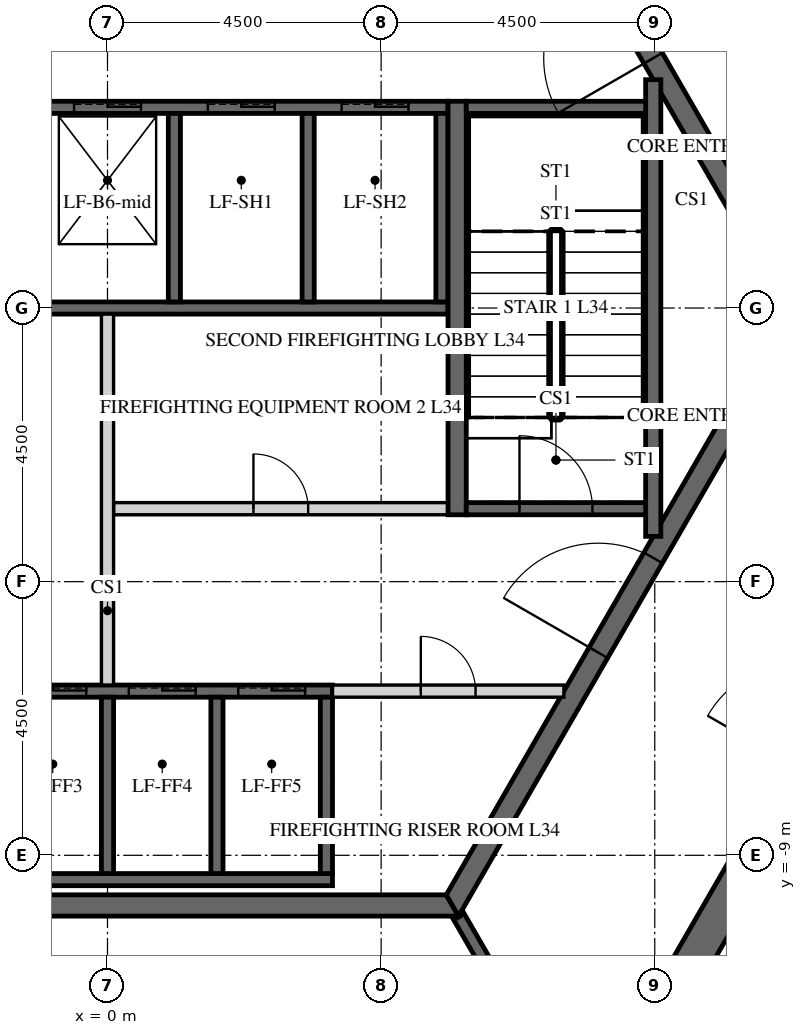
"""IFC4 building model, lengths in metres.
Left out: names, types, materials, properties, quantities, classifications, styles, units other than length and angle.
Written with IfcOpenShell. Run it as: python <this file> out.ifc"""

import sys

from ifc_helpers import new_model, si_unit, direction, frame, frame_2d, origin, place, context, subcontext, project, spatial, polyline, rectangle, outline, extrude, element, fill, save


model = new_model("IFC4")
c1 = context("Model", 3, precision=1e-05, world=origin(), true_north=direction((0.0, 1.0)))
c2 = subcontext(c1, "Body", "Model", "MODEL_VIEW")
j1 = project(units=[si_unit("LENGTHUNIT", "METRE"), si_unit("PLANEANGLEUNIT", "RADIAN")], contexts=[c1])
p1 = place(None, origin())
s1 = spatial("IfcSite", under=j1, at=p1, CompositionType="ELEMENT")
p2 = place(p1, origin())
s2 = spatial("IfcBuilding", under=s1, at=p2, CompositionType="ELEMENT")
p3 = place(p2, frame((0.0, 0.0, 146.7)))
s3 = spatial("IfcBuildingStorey", under=s2, at=p3, CompositionType="ELEMENT", Elevation=146.7)
p4 = place(p3, frame((7.91, -13.7, -0.3), z_axis=(0.0, 0.0, 1.0), x_axis=(0.499999880136, 0.866025472988, 0.0)))
e1 = element("IfcWall", 1, at=p4, inside=s3, PredefinedType="SHEAR", context=c2, shape_type="SweptSolid", body=[
    extrude(outline(polyline([(-0.173, -0.3), (15.993, -0.3), (15.646, 0.3), (0.173, 0.3), (-0.173, -0.3)])), origin(), (0.0, 0.0, 1.0), 5.8),
])
p5 = place(p4, frame((7.039, 0.0, 0.3)))
e2 = element("IfcOpeningElement", 2, at=p5, cuts=e1, PredefinedType="OPENING", context=c2, shape_type="SweptSolid", body=[
    extrude(rectangle(XDim=1.8, YDim=2.4, at=frame_2d((0.9, 1.2))), frame((0.0, 0.31, 0.0), z_axis=(0.0, -1.0, 0.0), x_axis=(1.0, 0.0, 0.0)), (0.0, 0.0, 1.0), 0.62),
])
p6 = place(p3, frame((15.819, 0.0, -0.3), z_axis=(0.0, 0.0, 1.0), x_axis=(-0.499999880136, 0.866025472988, 0.0)))
e3 = element("IfcWall", 3, at=p6, inside=s3, PredefinedType="SHEAR", context=c2, shape_type="SweptSolid", body=[
    extrude(outline(polyline([(-0.173, -0.3), (15.993, -0.3), (15.646, 0.3), (0.173, 0.3), (-0.173, -0.3)])), origin(), (0.0, 0.0, 1.0), 5.8),
])
p7 = place(p6, frame((6.981, 0.0, 0.3)))
e4 = element("IfcOpeningElement", 4, at=p7, cuts=e3, PredefinedType="OPENING", context=c2, shape_type="SweptSolid", body=[
    extrude(rectangle(XDim=1.8, YDim=2.4, at=frame_2d((0.9, 1.2))), frame((0.0, 0.31, 0.0), z_axis=(0.0, -1.0, 0.0), x_axis=(1.0, 0.0, 0.0)), (0.0, 0.0, 1.0), 0.62),
])
p8 = place(p3, frame((-5.673, -9.825, -0.3), z_axis=(0.0, 0.0, 1.0), x_axis=(1.0, 0.0, 0.0)))
e5 = element("IfcWall", 5, at=p8, inside=s3, PredefinedType="SHEAR", context=c2, shape_type="SweptSolid", body=[
    extrude(outline(polyline([(-0.101, -0.175), (11.446, -0.175), (11.244, 0.175), (0.101, 0.175), (-0.101, -0.175)])), origin(), (0.0, 0.0, 1.0), 5.8),
])
p9 = place(p3, frame((5.673, -9.825, -0.3), z_axis=(0.0, 0.0, 1.0), x_axis=(0.499995046907, 0.866028263435, 0.0)))
e6 = element("IfcWall", 6, at=p9, inside=s3, PredefinedType="SHEAR", context=c2, shape_type="SweptSolid", body=[
    extrude(outline(polyline([(-0.101, -0.175), (11.446, -0.175), (11.244, 0.175), (0.101, 0.175), (-0.101, -0.175)])), origin(), (0.0, 0.0, 1.0), 5.8),
])
p10 = place(p9, frame((4.801, 0.0, 0.3)))
e7 = element("IfcOpeningElement", 7, at=p10, cuts=e6, PredefinedType="OPENING", context=c2, shape_type="SweptSolid", body=[
    extrude(rectangle(XDim=1.8, YDim=2.4, at=frame_2d((0.9, 1.2))), frame((0.0, 0.185, 0.0), z_axis=(0.0, -1.0, 0.0), x_axis=(1.0, 0.0, 0.0)), (0.0, 0.0, 1.0), 0.37),
])
p11 = place(p3, frame((11.345, 0.0, -0.3), z_axis=(0.0, 0.0, 1.0), x_axis=(-0.499995046907, 0.866028263435, 0.0)))
e8 = element("IfcWall", 8, at=p11, inside=s3, PredefinedType="SHEAR", context=c2, shape_type="SweptSolid", body=[
    extrude(outline(polyline([(-0.101, -0.175), (11.446, -0.175), (11.244, 0.175), (0.101, 0.175), (-0.101, -0.175)])), origin(), (0.0, 0.0, 1.0), 5.8),
])
p12 = place(p11, frame((4.744, 0.0, 0.3)))
e9 = element("IfcOpeningElement", 9, at=p12, cuts=e8, PredefinedType="OPENING", context=c2, shape_type="SweptSolid", body=[
    extrude(rectangle(XDim=1.8, YDim=2.4, at=frame_2d((0.9, 1.2))), frame((0.0, 0.185, 0.0), z_axis=(0.0, -1.0, 0.0), x_axis=(1.0, 0.0, 0.0)), (0.0, 0.0, 1.0), 0.37),
])
p13 = place(p3, frame((-5.6, 3.3, -0.25), z_axis=(0.0, 0.0, 1.0), x_axis=(1.0, 0.0, 0.0)))
e10 = element("IfcWall", 10, at=p13, inside=s3, PredefinedType="SHEAR", context=c2, shape_type="SweptSolid", body=[
    extrude(rectangle(XDim=11.2, YDim=0.2, at=frame_2d((5.6, 0.0))), origin(), (0.0, 0.0, 1.0), 5.75),
])
p14 = place(p13, frame((0.65, 0.0, 0.25)))
e11 = element("IfcOpeningElement", 11, at=p14, cuts=e10, PredefinedType="OPENING", context=c2, shape_type="SweptSolid", body=[
    extrude(rectangle(XDim=1.1, YDim=2.1, at=frame_2d((0.55, 1.05))), frame((0.0, 0.11, 0.0), z_axis=(0.0, -1.0, 0.0), x_axis=(1.0, 0.0, 0.0)), (0.0, 0.0, 1.0), 0.22),
])
p15 = place(p13, frame((2.85, 0.0, 0.25)))
e12 = element("IfcOpeningElement", 12, at=p15, cuts=e10, PredefinedType="OPENING", context=c2, shape_type="SweptSolid", body=[
    extrude(rectangle(XDim=1.1, YDim=2.1, at=frame_2d((0.55, 1.05))), frame((0.0, 0.11, 0.0), z_axis=(0.0, -1.0, 0.0), x_axis=(1.0, 0.0, 0.0)), (0.0, 0.0, 1.0), 0.22),
])
p16 = place(p13, frame((5.05, 0.0, 0.25)))
e13 = element("IfcOpeningElement", 13, at=p16, cuts=e10, PredefinedType="OPENING", context=c2, shape_type="SweptSolid", body=[
    extrude(rectangle(XDim=1.1, YDim=2.1, at=frame_2d((0.55, 1.05))), frame((0.0, 0.11, 0.0), z_axis=(0.0, -1.0, 0.0), x_axis=(1.0, 0.0, 0.0)), (0.0, 0.0, 1.0), 0.22),
])
p17 = place(p13, frame((7.25, 0.0, 0.25)))
e14 = element("IfcOpeningElement", 14, at=p17, cuts=e10, PredefinedType="OPENING", context=c2, shape_type="SweptSolid", body=[
    extrude(rectangle(XDim=1.1, YDim=2.1, at=frame_2d((0.55, 1.05))), frame((0.0, 0.11, 0.0), z_axis=(0.0, -1.0, 0.0), x_axis=(1.0, 0.0, 0.0)), (0.0, 0.0, 1.0), 0.22),
])
p18 = place(p13, frame((9.45, 0.0, 0.25)))
e15 = element("IfcOpeningElement", 15, at=p18, cuts=e10, PredefinedType="OPENING", context=c2, shape_type="SweptSolid", body=[
    extrude(rectangle(XDim=1.1, YDim=2.1, at=frame_2d((0.55, 1.05))), frame((0.0, 0.11, 0.0), z_axis=(0.0, -1.0, 0.0), x_axis=(1.0, 0.0, 0.0)), (0.0, 0.0, 1.0), 0.22),
])
p19 = place(p3, frame((-5.6, 0.0, -0.25), z_axis=(0.0, 0.0, 1.0), x_axis=(1.0, 0.0, 0.0)))
e16 = element("IfcWall", 16, at=p19, inside=s3, PredefinedType="SHEAR", context=c2, shape_type="SweptSolid", body=[
    extrude(rectangle(XDim=11.2, YDim=0.2, at=frame_2d((5.6, 0.0))), origin(), (0.0, 0.0, 1.0), 5.75),
])
for number, where, z_axis, x_axis in (
    (17, (1.1, 0.1, -0.25), (0.0, 0.0, 1.0), (0.0, 1.0, 0.0)),
    (18, (3.3, 0.1, -0.25), (0.0, 0.0, 1.0), (0.0, 1.0, 0.0)),
    (19, (5.5, 0.1, -0.25), (0.0, 0.0, 1.0), (0.0, 1.0, 0.0)),
):
    element("IfcWall", number, at=place(p3, frame(where, z_axis=z_axis, x_axis=x_axis)), inside=s3, PredefinedType="SHEAR", context=c2, shape_type="SweptSolid", body=[
        extrude(rectangle(XDim=3.1, YDim=0.2, at=frame_2d((1.55, 0.0))), origin(), (0.0, 0.0, 1.0), 5.75),
    ])
p20 = place(p3, frame((-5.5, -6.3, -0.25), z_axis=(0.0, 0.0, 1.0), x_axis=(1.0, 0.0, 0.0)))
e20 = element("IfcWall", 20, at=p20, inside=s3, PredefinedType="SHEAR", context=c2, shape_type="SweptSolid", body=[
    extrude(rectangle(XDim=9.2, YDim=0.2, at=frame_2d((4.6, 0.0))), origin(), (0.0, 0.0, 1.0), 5.75),
])
p21 = place(p20, frame((0.45, 0.0, 0.25)))
e21 = element("IfcOpeningElement", 21, at=p21, cuts=e20, PredefinedType="OPENING", context=c2, shape_type="SweptSolid", body=[
    extrude(rectangle(XDim=1.1, YDim=2.1, at=frame_2d((0.55, 1.05))), frame((0.0, 0.11, 0.0), z_axis=(0.0, -1.0, 0.0), x_axis=(1.0, 0.0, 0.0)), (0.0, 0.0, 1.0), 0.22),
])
p22 = place(p20, frame((2.25, 0.0, 0.25)))
e22 = element("IfcOpeningElement", 22, at=p22, cuts=e20, PredefinedType="OPENING", context=c2, shape_type="SweptSolid", body=[
    extrude(rectangle(XDim=1.1, YDim=2.1, at=frame_2d((0.55, 1.05))), frame((0.0, 0.11, 0.0), z_axis=(0.0, -1.0, 0.0), x_axis=(1.0, 0.0, 0.0)), (0.0, 0.0, 1.0), 0.22),
])
p23 = place(p20, frame((4.05, 0.0, 0.25)))
e23 = element("IfcOpeningElement", 23, at=p23, cuts=e20, PredefinedType="OPENING", context=c2, shape_type="SweptSolid", body=[
    extrude(rectangle(XDim=1.1, YDim=2.1, at=frame_2d((0.55, 1.05))), frame((0.0, 0.11, 0.0), z_axis=(0.0, -1.0, 0.0), x_axis=(1.0, 0.0, 0.0)), (0.0, 0.0, 1.0), 0.22),
])
p24 = place(p20, frame((5.85, 0.0, 0.25)))
e24 = element("IfcOpeningElement", 24, at=p24, cuts=e20, PredefinedType="OPENING", context=c2, shape_type="SweptSolid", body=[
    extrude(rectangle(XDim=1.1, YDim=2.1, at=frame_2d((0.55, 1.05))), frame((0.0, 0.11, 0.0), z_axis=(0.0, -1.0, 0.0), x_axis=(1.0, 0.0, 0.0)), (0.0, 0.0, 1.0), 0.22),
])
p25 = place(p20, frame((7.65, 0.0, 0.25)))
e25 = element("IfcOpeningElement", 25, at=p25, cuts=e20, PredefinedType="OPENING", context=c2, shape_type="SweptSolid", body=[
    extrude(rectangle(XDim=1.1, YDim=2.1, at=frame_2d((0.55, 1.05))), frame((0.0, 0.11, 0.0), z_axis=(0.0, -1.0, 0.0), x_axis=(1.0, 0.0, 0.0)), (0.0, 0.0, 1.0), 0.22),
])
p26 = place(p3, frame((-5.5, -9.4, -0.25), z_axis=(0.0, 0.0, 1.0), x_axis=(1.0, 0.0, 0.0)))
e26 = element("IfcWall", 26, at=p26, inside=s3, PredefinedType="SHEAR", context=c2, shape_type="SweptSolid", body=[
    extrude(rectangle(XDim=9.2, YDim=0.2, at=frame_2d((4.6, 0.0))), origin(), (0.0, 0.0, 1.0), 5.75),
])
for number, where, z_axis, x_axis in (
    (27, (0.0, -9.3, -0.25), (0.0, 0.0, 1.0), (0.0, 1.0, 0.0)),
    (28, (1.8, -9.3, -0.25), (0.0, 0.0, 1.0), (0.0, 1.0, 0.0)),
    (29, (3.6, -9.3, -0.25), (0.0, 0.0, 1.0), (0.0, 1.0, 0.0)),
):
    element("IfcWall", number, at=place(p3, frame(where, z_axis=z_axis, x_axis=x_axis)), inside=s3, PredefinedType="SHEAR", context=c2, shape_type="SweptSolid", body=[
        extrude(rectangle(XDim=2.9, YDim=0.2, at=frame_2d((1.45, 0.0))), origin(), (0.0, 0.0, 1.0), 5.75),
    ])
p27 = place(p3, frame((0.1, -3.3, 0.0), z_axis=(0.0, 0.0, 1.0), x_axis=(1.0, 0.0, 0.0)))
e30 = element("IfcWall", 30, at=p27, inside=s3, PredefinedType="PARTITIONING", context=c2, shape_type="SweptSolid", body=[
    extrude(rectangle(XDim=5.5, YDim=0.2, at=frame_2d((2.75, 0.0))), origin(), (0.0, 0.0, 1.0), 5.5),
])
p28 = place(p27, frame((2.3, 0.0, 0.0)))
e31 = element("IfcOpeningElement", 31, at=p28, cuts=e30, PredefinedType="OPENING", context=c2, shape_type="SweptSolid", body=[
    extrude(rectangle(XDim=0.9, YDim=2.1, at=frame_2d((0.45, 1.05))), frame((0.0, 0.11, 0.0), z_axis=(0.0, -1.0, 0.0), x_axis=(1.0, 0.0, 0.0)), (0.0, 0.0, 1.0), 0.22),
])
p29 = place(p3, frame((0.0, -6.2, 0.0), z_axis=(0.0, 0.0, 1.0), x_axis=(0.0, 1.0, 0.0)))
e32 = element("IfcWall", 32, at=p29, inside=s3, PredefinedType="PARTITIONING", context=c2, shape_type="SweptSolid", body=[
    extrude(rectangle(XDim=6.1, YDim=0.2, at=frame_2d((3.05, 0.0))), origin(), (0.0, 0.0, 1.0), 5.5),
])
p30 = place(p3, frame((3.7, -6.3, 0.0), z_axis=(0.0, 0.0, 1.0), x_axis=(1.0, 0.0, 0.0)))
e33 = element("IfcWall", 33, at=p30, inside=s3, PredefinedType="PARTITIONING", context=c2, shape_type="SweptSolid", body=[
    extrude(rectangle(XDim=3.806, YDim=0.2, at=frame_2d((1.903, 0.0))), origin(), (0.0, 0.0, 1.0), 5.5),
])
p31 = place(p30, frame((1.453, 0.0, 0.0)))
e34 = element("IfcOpeningElement", 34, at=p31, cuts=e33, PredefinedType="OPENING", context=c2, shape_type="SweptSolid", body=[
    extrude(rectangle(XDim=0.9, YDim=2.1, at=frame_2d((0.45, 1.05))), frame((0.0, 0.11, 0.0), z_axis=(0.0, -1.0, 0.0), x_axis=(1.0, 0.0, 0.0)), (0.0, 0.0, 1.0), 0.22),
])
p32 = place(p3, frame((5.773, -10.0, -0.3), z_axis=(0.0, 0.0, 1.0), x_axis=(0.500038251005, -0.86600331843, 0.0)))
e35 = element("IfcWall", 35, at=p32, inside=s3, PredefinedType="SHEAR", context=c2, shape_type="SweptSolid", body=[
    extrude(rectangle(XDim=3.926, YDim=0.2, at=frame_2d((1.963, 0.0))), origin(), (0.0, 0.0, 1.0), 5.8),
])
p33 = place(p3, frame((5.75, -3.4, -0.25), z_axis=(0.0, 0.0, 1.0), x_axis=(0.0, 1.0, 0.0)))
e36 = element("IfcWall", 36, at=p33, inside=s3, PredefinedType="SHEAR", context=c2, shape_type="SweptSolid", body=[
    extrude(rectangle(XDim=6.8, YDim=0.3, at=frame_2d((3.4, 0.0))), origin(), (0.0, 0.0, 1.0), 5.75),
])
p34 = place(p3, frame((8.975, -3.755, -0.25), z_axis=(0.0, 0.0, 1.0), x_axis=(0.0, 1.0, 0.0)))
e37 = element("IfcWall", 37, at=p34, inside=s3, PredefinedType="SHEAR", context=c2, shape_type="SweptSolid", body=[
    extrude(rectangle(XDim=7.51, YDim=0.25, at=frame_2d((3.755, 0.0))), origin(), (0.0, 0.0, 1.0), 5.75),
])
p35 = place(p3, frame((5.9, 3.3, -0.25), z_axis=(0.0, 0.0, 1.0), x_axis=(1.0, 0.0, 0.0)))
e38 = element("IfcWall", 38, at=p35, inside=s3, PredefinedType="SHEAR", context=c2, shape_type="SweptSolid", body=[
    extrude(rectangle(XDim=2.95, YDim=0.2, at=frame_2d((1.475, 0.0))), origin(), (0.0, 0.0, 1.0), 5.75),
])
p36 = place(p3, frame((5.9, -3.3, -0.25), z_axis=(0.0, 0.0, 1.0), x_axis=(1.0, 0.0, 0.0)))
e39 = element("IfcWall", 39, at=p36, inside=s3, PredefinedType="SHEAR", context=c2, shape_type="SweptSolid", body=[
    extrude(rectangle(XDim=2.95, YDim=0.2, at=frame_2d((1.475, 0.0))), origin(), (0.0, 0.0, 1.0), 5.75),
])
p37 = place(p36, frame((0.875, 0.0, 0.25)))
e40 = element("IfcOpeningElement", 40, at=p37, cuts=e39, PredefinedType="OPENING", context=c2, shape_type="SweptSolid", body=[
    extrude(rectangle(XDim=1.2, YDim=2.4, at=frame_2d((0.6, 1.2))), frame((0.0, 0.11, 0.0), z_axis=(0.0, -1.0, 0.0), x_axis=(1.0, 0.0, 0.0)), (0.0, 0.0, 1.0), 0.22),
])
p38 = place(p12, origin())
e41 = element("IfcDoor", 41, at=p38, inside=s3, OperationType="DOUBLE_DOOR_SINGLE_SWING", PredefinedType="DOOR", context=c2, shape_type="SweptSolid", body=[
    extrude(rectangle(XDim=1.8, YDim=2.4, at=frame_2d((0.9, 1.2))), frame((0.0, 0.025, 0.0), z_axis=(0.0, -1.0, 0.0), x_axis=(1.0, 0.0, 0.0)), (0.0, 0.0, 1.0), 0.05),
])
fill(e9, e41)
p39 = place(p10, origin())
e42 = element("IfcDoor", 42, at=p39, inside=s3, OperationType="DOUBLE_DOOR_SINGLE_SWING", PredefinedType="DOOR", context=c2, shape_type="SweptSolid", body=[
    extrude(rectangle(XDim=1.8, YDim=2.4, at=frame_2d((0.9, 1.2))), frame((0.0, 0.025, 0.0), z_axis=(0.0, -1.0, 0.0), x_axis=(1.0, 0.0, 0.0)), (0.0, 0.0, 1.0), 0.05),
])
fill(e7, e42)
p40 = place(p28, origin())
e43 = element("IfcDoor", 43, at=p40, inside=s3, OperationType="SINGLE_SWING_LEFT", PredefinedType="DOOR", context=c2, shape_type="SweptSolid", body=[
    extrude(rectangle(XDim=0.9, YDim=2.1, at=frame_2d((0.45, 1.05))), frame((0.0, 0.025, 0.0), z_axis=(0.0, -1.0, 0.0), x_axis=(1.0, 0.0, 0.0)), (0.0, 0.0, 1.0), 0.05),
])
fill(e31, e43)
p41 = place(p31, origin())
e44 = element("IfcDoor", 44, at=p41, inside=s3, OperationType="SINGLE_SWING_LEFT", PredefinedType="DOOR", context=c2, shape_type="SweptSolid", body=[
    extrude(rectangle(XDim=0.9, YDim=2.1, at=frame_2d((0.45, 1.05))), frame((0.0, 0.025, 0.0), z_axis=(0.0, -1.0, 0.0), x_axis=(1.0, 0.0, 0.0)), (0.0, 0.0, 1.0), 0.05),
])
fill(e34, e44)
p42 = place(p37, origin())
e45 = element("IfcDoor", 45, at=p42, inside=s3, OperationType="SINGLE_SWING_LEFT", PredefinedType="DOOR", context=c2, shape_type="SweptSolid", body=[
    extrude(rectangle(XDim=1.2, YDim=2.4, at=frame_2d((0.6, 1.2))), frame((0.0, 0.025, 0.0), z_axis=(0.0, -1.0, 0.0), x_axis=(1.0, 0.0, 0.0)), (0.0, 0.0, 1.0), 0.05),
])
fill(e40, e45)
p43 = place(p16, origin())
e46 = element("IfcDoor", 46, at=p43, inside=s3, OperationType="SLIDING_TO_LEFT", PredefinedType="DOOR", context=c2, shape_type="SweptSolid", body=[
    extrude(rectangle(XDim=1.1, YDim=2.1, at=frame_2d((0.55, 1.05))), frame((0.0, 0.025, 0.0), z_axis=(0.0, -1.0, 0.0), x_axis=(1.0, 0.0, 0.0)), (0.0, 0.0, 1.0), 0.05),
])
fill(e13, e46)
p44 = place(p17, origin())
e47 = element("IfcDoor", 47, at=p44, inside=s3, OperationType="SLIDING_TO_LEFT", PredefinedType="DOOR", context=c2, shape_type="SweptSolid", body=[
    extrude(rectangle(XDim=1.1, YDim=2.1, at=frame_2d((0.55, 1.05))), frame((0.0, 0.025, 0.0), z_axis=(0.0, -1.0, 0.0), x_axis=(1.0, 0.0, 0.0)), (0.0, 0.0, 1.0), 0.05),
])
fill(e14, e47)
p45 = place(p18, origin())
e48 = element("IfcDoor", 48, at=p45, inside=s3, OperationType="SLIDING_TO_LEFT", PredefinedType="DOOR", context=c2, shape_type="SweptSolid", body=[
    extrude(rectangle(XDim=1.1, YDim=2.1, at=frame_2d((0.55, 1.05))), frame((0.0, 0.025, 0.0), z_axis=(0.0, -1.0, 0.0), x_axis=(1.0, 0.0, 0.0)), (0.0, 0.0, 1.0), 0.05),
])
fill(e15, e48)
p46 = place(p23, origin())
e49 = element("IfcDoor", 49, at=p46, inside=s3, OperationType="SLIDING_TO_LEFT", PredefinedType="DOOR", context=c2, shape_type="SweptSolid", body=[
    extrude(rectangle(XDim=1.1, YDim=2.1, at=frame_2d((0.55, 1.05))), frame((0.0, 0.025, 0.0), z_axis=(0.0, -1.0, 0.0), x_axis=(1.0, 0.0, 0.0)), (0.0, 0.0, 1.0), 0.05),
])
fill(e23, e49)
p47 = place(p24, origin())
e50 = element("IfcDoor", 50, at=p47, inside=s3, OperationType="SLIDING_TO_LEFT", PredefinedType="DOOR", context=c2, shape_type="SweptSolid", body=[
    extrude(rectangle(XDim=1.1, YDim=2.1, at=frame_2d((0.55, 1.05))), frame((0.0, 0.025, 0.0), z_axis=(0.0, -1.0, 0.0), x_axis=(1.0, 0.0, 0.0)), (0.0, 0.0, 1.0), 0.05),
])
fill(e24, e50)
p48 = place(p25, origin())
e51 = element("IfcDoor", 51, at=p48, inside=s3, OperationType="SLIDING_TO_LEFT", PredefinedType="DOOR", context=c2, shape_type="SweptSolid", body=[
    extrude(rectangle(XDim=1.1, YDim=2.1, at=frame_2d((0.55, 1.05))), frame((0.0, 0.025, 0.0), z_axis=(0.0, -1.0, 0.0), x_axis=(1.0, 0.0, 0.0)), (0.0, 0.0, 1.0), 0.05),
])
fill(e25, e51)
save(model, sys.argv[1])
